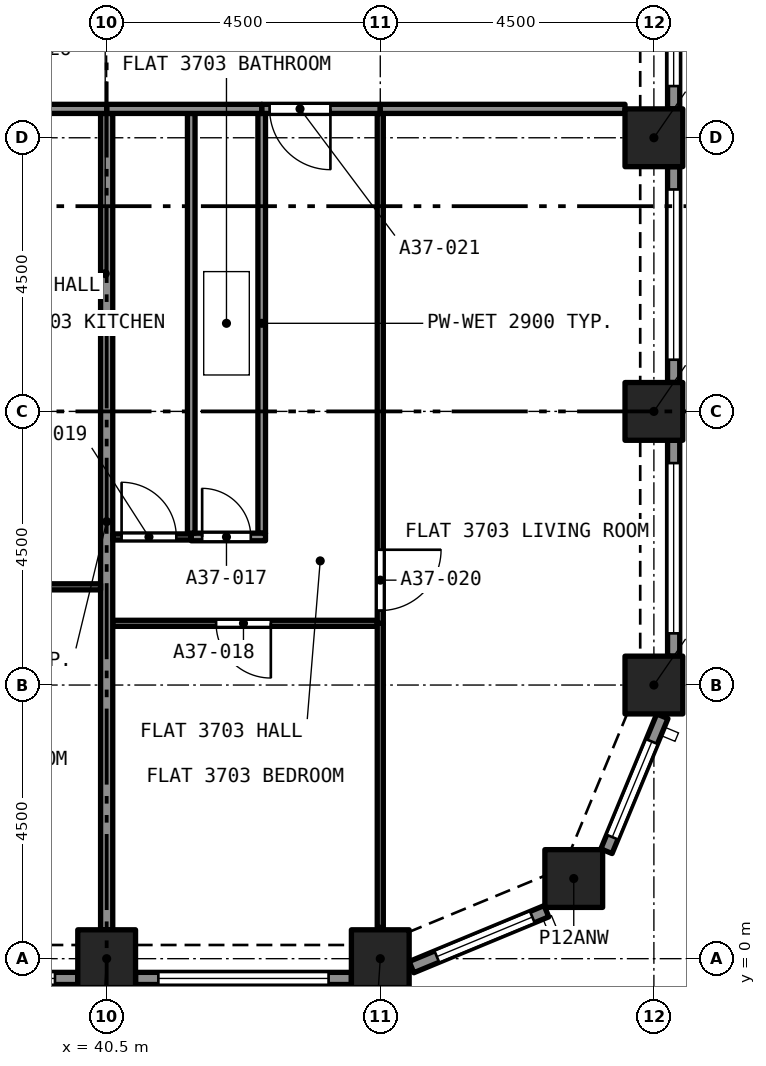
"""IFC4 building model, lengths in metres.
Left out: names, types, materials, properties, quantities, classifications, styles, units other than length and angle.
Written with IfcOpenShell. Run it as: python <this file> out.ifc"""

import sys

from ifc_helpers import new_model, si_unit, direction, frame, frame_2d, origin, origin_2d, place, context, subcontext, project, spatial, rectangle, extrude, element, fill, save


model = new_model("IFC4")
c1 = context("Model", 3, precision=1e-05, world=origin(), true_north=direction((0.0, 1.0)))
c2 = subcontext(c1, "Body", "Model", "MODEL_VIEW")
j1 = project(units=[si_unit("LENGTHUNIT", "METRE"), si_unit("PLANEANGLEUNIT", "RADIAN")], contexts=[c1])
p1 = place(None, origin())
s1 = spatial("IfcSite", under=j1, at=p1, CompositionType="ELEMENT")
p2 = place(p1, origin())
s2 = spatial("IfcBuilding", under=s1, at=p2, CompositionType="ELEMENT")
p3 = place(p2, frame((0.0, 0.0, 133.4)))
s3 = spatial("IfcBuildingStorey", under=s2, at=p3, CompositionType="ELEMENT", Elevation=133.4)
for number, where, z_axis, x_axis in (
    (1, (40.5, 0.0, 0.0), (0.0, 0.0, 1.0), (1.0, 0.0, 0.0)),
    (2, (45.0, 0.0, 0.0), (0.0, 0.0, 1.0), (1.0, 0.0, 0.0)),
    (3, (48.182, 1.318, 0.0), (0.0, 0.0, 1.0), (1.0, 0.0, 0.0)),
    (4, (49.5, 4.5, 0.0), (0.0, 0.0, 1.0), (1.0, 0.0, 0.0)),
    (5, (49.5, 9.0, 0.0), (0.0, 0.0, 1.0), (1.0, 0.0, 0.0)),
    (6, (49.5, 13.5, 0.0), (0.0, 0.0, 1.0), (1.0, 0.0, 0.0)),
):
    element("IfcColumn", number, at=place(p3, frame(where, z_axis=z_axis, x_axis=x_axis)), inside=s3, PredefinedType="COLUMN", context=c2, shape_type="SweptSolid", body=[
        extrude(rectangle(XDim=0.95, YDim=0.95, at=origin_2d()), origin(), (0.0, 0.0, 1.0), 3.2),
    ])
p4 = place(p3, frame((40.025, -0.325, 0.0), z_axis=(0.0, 0.0, 1.0), x_axis=(-1.0, 0.0, 0.0)))
e7 = element("IfcWall", 7, at=p4, inside=s3, PredefinedType="SOLIDWALL", context=c2, shape_type="SweptSolid", body=[
    extrude(rectangle(XDim=3.55, YDim=0.2, at=frame_2d((1.775, 0.0))), origin(), (0.0, 0.0, 1.0), 3.2),
])
p5 = place(p4, frame((0.375, 0.0, 0.45)))
e8 = element("IfcOpeningElement", 8, at=p5, cuts=e7, PredefinedType="OPENING", context=c2, shape_type="SweptSolid", body=[
    extrude(rectangle(XDim=2.8, YDim=1.95, at=frame_2d((1.4, 0.975))), frame((0.0, 0.11, 0.0), z_axis=(0.0, -1.0, 0.0), x_axis=(1.0, 0.0, 0.0)), (0.0, 0.0, 1.0), 0.22),
])
p6 = place(p3, frame((44.525, -0.325, 0.0), z_axis=(0.0, 0.0, 1.0), x_axis=(-1.0, 0.0, 0.0)))
e9 = element("IfcWall", 9, at=p6, inside=s3, PredefinedType="SOLIDWALL", context=c2, shape_type="SweptSolid", body=[
    extrude(rectangle(XDim=3.55, YDim=0.2, at=frame_2d((1.775, 0.0))), origin(), (0.0, 0.0, 1.0), 3.2),
])
p7 = place(p6, frame((0.375, 0.0, 0.45)))
e10 = element("IfcOpeningElement", 10, at=p7, cuts=e9, PredefinedType="OPENING", context=c2, shape_type="SweptSolid", body=[
    extrude(rectangle(XDim=2.8, YDim=1.95, at=frame_2d((1.4, 0.975))), frame((0.0, 0.11, 0.0), z_axis=(0.0, -1.0, 0.0), x_axis=(1.0, 0.0, 0.0)), (0.0, 0.0, 1.0), 0.22),
])
p8 = place(p3, frame((47.733, 0.78, 0.0), z_axis=(0.0, 0.0, 1.0), x_axis=(-0.923880599843, -0.382680855588, 0.0)))
e11 = element("IfcWall", 11, at=p8, inside=s3, PredefinedType="SOLIDWALL", context=c2, shape_type="SweptSolid", body=[
    extrude(rectangle(XDim=2.403, YDim=0.2, at=frame_2d((1.201, 0.0))), origin(), (0.0, 0.0, 1.0), 3.2),
])
p9 = place(p8, frame((0.251, 0.0, 0.45)))
e12 = element("IfcOpeningElement", 12, at=p9, cuts=e11, PredefinedType="OPENING", context=c2, shape_type="SweptSolid", body=[
    extrude(rectangle(XDim=1.7, YDim=1.95, at=frame_2d((0.85, 0.975))), frame((0.0, 0.11, 0.0), z_axis=(0.0, -1.0, 0.0), x_axis=(1.0, 0.0, 0.0)), (0.0, 0.0, 1.0), 0.22),
])
p10 = place(p3, frame((49.639, 3.987, 0.0), z_axis=(0.0, 0.0, 1.0), x_axis=(-0.382680855588, -0.923880599843, 0.0)))
e13 = element("IfcWall", 13, at=p10, inside=s3, PredefinedType="SOLIDWALL", context=c2, shape_type="SweptSolid", body=[
    extrude(rectangle(XDim=2.403, YDim=0.2, at=frame_2d((1.201, 0.0))), origin(), (0.0, 0.0, 1.0), 3.2),
])
p11 = place(p10, frame((0.451, 0.0, 0.45)))
e14 = element("IfcOpeningElement", 14, at=p11, cuts=e13, PredefinedType="OPENING", context=c2, shape_type="SweptSolid", body=[
    extrude(rectangle(XDim=1.7, YDim=1.95, at=frame_2d((0.85, 0.975))), frame((0.0, 0.11, 0.0), z_axis=(0.0, -1.0, 0.0), x_axis=(1.0, 0.0, 0.0)), (0.0, 0.0, 1.0), 0.22),
])
p12 = place(p3, frame((49.825, 8.525, 0.0), z_axis=(0.0, 0.0, 1.0), x_axis=(0.0, -1.0, 0.0)))
e15 = element("IfcWall", 15, at=p12, inside=s3, PredefinedType="SOLIDWALL", context=c2, shape_type="SweptSolid", body=[
    extrude(rectangle(XDim=3.55, YDim=0.2, at=frame_2d((1.775, 0.0))), origin(), (0.0, 0.0, 1.0), 3.2),
])
p13 = place(p12, frame((0.375, 0.0, 0.45)))
e16 = element("IfcOpeningElement", 16, at=p13, cuts=e15, PredefinedType="OPENING", context=c2, shape_type="SweptSolid", body=[
    extrude(rectangle(XDim=2.8, YDim=1.95, at=frame_2d((1.4, 0.975))), frame((0.0, 0.11, 0.0), z_axis=(0.0, -1.0, 0.0), x_axis=(1.0, 0.0, 0.0)), (0.0, 0.0, 1.0), 0.22),
])
p14 = place(p3, frame((49.825, 13.025, 0.0), z_axis=(0.0, 0.0, 1.0), x_axis=(0.0, -1.0, 0.0)))
e17 = element("IfcWall", 17, at=p14, inside=s3, PredefinedType="SOLIDWALL", context=c2, shape_type="SweptSolid", body=[
    extrude(rectangle(XDim=3.55, YDim=0.2, at=frame_2d((1.775, 0.0))), origin(), (0.0, 0.0, 1.0), 3.2),
])
p15 = place(p14, frame((0.375, 0.0, 0.45)))
e18 = element("IfcOpeningElement", 18, at=p15, cuts=e17, PredefinedType="OPENING", context=c2, shape_type="SweptSolid", body=[
    extrude(rectangle(XDim=2.8, YDim=1.95, at=frame_2d((1.4, 0.975))), frame((0.0, 0.11, 0.0), z_axis=(0.0, -1.0, 0.0), x_axis=(1.0, 0.0, 0.0)), (0.0, 0.0, 1.0), 0.22),
])
p16 = place(p3, frame((49.825, 17.525, 0.0), z_axis=(0.0, 0.0, 1.0), x_axis=(0.0, -1.0, 0.0)))
e19 = element("IfcWall", 19, at=p16, inside=s3, PredefinedType="SOLIDWALL", context=c2, shape_type="SweptSolid", body=[
    extrude(rectangle(XDim=3.55, YDim=0.2, at=frame_2d((1.775, 0.0))), origin(), (0.0, 0.0, 1.0), 3.2),
])
p17 = place(p16, frame((0.375, 0.0, 0.45)))
e20 = element("IfcOpeningElement", 20, at=p17, cuts=e19, PredefinedType="OPENING", context=c2, shape_type="SweptSolid", body=[
    extrude(rectangle(XDim=2.8, YDim=1.95, at=frame_2d((1.4, 0.975))), frame((0.0, 0.11, 0.0), z_axis=(0.0, -1.0, 0.0), x_axis=(1.0, 0.0, 0.0)), (0.0, 0.0, 1.0), 0.22),
])
p18 = place(p3, frame((43.05, 6.998, 0.0), z_axis=(0.0, 0.0, 1.0), x_axis=(0.0, 1.0, 0.0)))
e21 = element("IfcWall", 21, at=p18, inside=s3, PredefinedType="PARTITIONING", context=c2, shape_type="SweptSolid", body=[
    extrude(rectangle(XDim=6.902, YDim=0.125, at=frame_2d((3.451, 0.0))), origin(), (0.0, 0.0, 1.0), 2.9),
])
p19 = place(p3, frame((41.891, 6.935, 0.0), z_axis=(0.0, 0.0, 1.0), x_axis=(1.0, 0.0, 0.0)))
e22 = element("IfcWall", 22, at=p19, inside=s3, PredefinedType="PARTITIONING", context=c2, shape_type="SweptSolid", body=[
    extrude(rectangle(XDim=1.222, YDim=0.125, at=frame_2d((0.611, 0.0))), origin(), (0.0, 0.0, 1.0), 2.9),
])
p20 = place(p19, frame((0.179, 0.0, 0.0)))
e23 = element("IfcOpeningElement", 23, at=p20, cuts=e22, PredefinedType="OPENING", context=c2, shape_type="SweptSolid", body=[
    extrude(rectangle(XDim=0.8, YDim=2.1, at=frame_2d((0.4, 1.05))), frame((0.0, 0.073, 0.0), z_axis=(0.0, -1.0, 0.0), x_axis=(1.0, 0.0, 0.0)), (0.0, 0.0, 1.0), 0.145),
])
p21 = place(p3, frame((41.891, 6.998, 0.0), z_axis=(0.0, 0.0, 1.0), x_axis=(0.0, 1.0, 0.0)))
e24 = element("IfcWall", 24, at=p21, inside=s3, PredefinedType="PARTITIONING", context=c2, shape_type="SweptSolid", body=[
    extrude(rectangle(XDim=6.902, YDim=0.125, at=frame_2d((3.451, 0.0))), origin(), (0.0, 0.0, 1.0), 2.9),
])
p22 = place(p3, frame((44.95, 5.515, 0.0), z_axis=(0.0, 0.0, 1.0), x_axis=(-1.0, 0.0, 0.0)))
e25 = element("IfcWall", 25, at=p22, inside=s3, PredefinedType="PARTITIONING", context=c2, shape_type="SweptSolid", body=[
    extrude(rectangle(XDim=4.35, YDim=0.1, at=frame_2d((2.175, 0.0))), origin(), (0.0, 0.0, 1.0), 2.9),
])
p23 = place(p22, frame((1.75, 0.0, 0.0)))
e26 = element("IfcOpeningElement", 26, at=p23, cuts=e25, PredefinedType="OPENING", context=c2, shape_type="SweptSolid", body=[
    extrude(rectangle(XDim=0.9, YDim=2.1, at=frame_2d((0.45, 1.05))), frame((0.0, 0.06, 0.0), z_axis=(0.0, -1.0, 0.0), x_axis=(1.0, 0.0, 0.0)), (0.0, 0.0, 1.0), 0.12),
])
p24 = place(p3, frame((45.0, 0.514, 0.0), z_axis=(0.0, 0.0, 1.0), x_axis=(0.0, 1.0, 0.0)))
e27 = element("IfcWall", 27, at=p24, inside=s3, PredefinedType="PARTITIONING", context=c2, shape_type="SweptSolid", body=[
    extrude(rectangle(XDim=5.001, YDim=0.1, at=frame_2d((2.5, 0.0))), origin(), (0.0, 0.0, 1.0), 2.9),
])
p25 = place(p3, frame((40.5, 0.475, 0.0), z_axis=(0.0, 0.0, 1.0), x_axis=(0.0, 1.0, 0.0)))
e28 = element("IfcWall", 28, at=p25, inside=s3, PredefinedType="PARTITIONING", context=c2, shape_type="SweptSolid", body=[
    extrude(rectangle(XDim=13.425, YDim=0.2, at=frame_2d((6.712, 0.0))), origin(), (0.0, 0.0, 1.0), 2.9),
])
p26 = place(p3, frame((40.6, 6.935, 0.0), z_axis=(0.0, 0.0, 1.0), x_axis=(1.0, 0.0, 0.0)))
e29 = element("IfcWall", 29, at=p26, inside=s3, PredefinedType="PARTITIONING", context=c2, shape_type="SweptSolid", body=[
    extrude(rectangle(XDim=1.291, YDim=0.1, at=frame_2d((0.646, 0.0))), origin(), (0.0, 0.0, 1.0), 2.9),
])
p27 = place(p26, frame((0.146, 0.0, 0.0)))
e30 = element("IfcOpeningElement", 30, at=p27, cuts=e29, PredefinedType="OPENING", context=c2, shape_type="SweptSolid", body=[
    extrude(rectangle(XDim=0.9, YDim=2.1, at=frame_2d((0.45, 1.05))), frame((0.0, 0.06, 0.0), z_axis=(0.0, -1.0, 0.0), x_axis=(1.0, 0.0, 0.0)), (0.0, 0.0, 1.0), 0.12),
])
p28 = place(p3, frame((45.0, 13.9, 0.0), z_axis=(0.0, 0.0, 1.0), x_axis=(0.0, -1.0, 0.0)))
e31 = element("IfcWall", 31, at=p28, inside=s3, PredefinedType="PARTITIONING", context=c2, shape_type="SweptSolid", body=[
    extrude(rectangle(XDim=8.385, YDim=0.1, at=frame_2d((4.192, 0.0))), origin(), (0.0, 0.0, 1.0), 2.9),
])
p29 = place(p28, frame((7.175, 0.0, 0.0)))
e32 = element("IfcOpeningElement", 32, at=p29, cuts=e31, PredefinedType="OPENING", context=c2, shape_type="SweptSolid", body=[
    extrude(rectangle(XDim=1.0, YDim=2.1, at=frame_2d((0.5, 1.05))), frame((0.0, 0.06, 0.0), z_axis=(0.0, -1.0, 0.0), x_axis=(1.0, 0.0, 0.0)), (0.0, 0.0, 1.0), 0.12),
])
p30 = place(p3, frame((45.0, 13.975, 0.0), z_axis=(0.0, 0.0, 1.0), x_axis=(-1.0, 0.0, 0.0)))
e33 = element("IfcWall", 33, at=p30, inside=s3, PredefinedType="PARTITIONING", context=c2, shape_type="SweptSolid", body=[
    extrude(rectangle(XDim=1.95, YDim=0.15, at=frame_2d((0.975, 0.0))), origin(), (0.0, 0.0, 1.0), 2.9),
])
p31 = place(p30, frame((0.82, 0.0, 0.0)))
e34 = element("IfcOpeningElement", 34, at=p31, cuts=e33, PredefinedType="OPENING", context=c2, shape_type="SweptSolid", body=[
    extrude(rectangle(XDim=1.0, YDim=2.1, at=frame_2d((0.5, 1.05))), frame((0.0, 0.085, 0.0), z_axis=(0.0, -1.0, 0.0), x_axis=(1.0, 0.0, 0.0)), (0.0, 0.0, 1.0), 0.17),
])
p32 = place(p3, frame((40.5, 13.975, 0.0), z_axis=(0.0, 0.0, 1.0), x_axis=(1.0, 0.0, 0.0)))
e35 = element("IfcWall", 35, at=p32, inside=s3, PredefinedType="PARTITIONING", context=c2, shape_type="SweptSolid", body=[
    extrude(rectangle(XDim=2.55, YDim=0.15, at=frame_2d((1.275, 0.0))), origin(), (0.0, 0.0, 1.0), 2.9),
])
p33 = place(p3, frame((45.0, 13.975, 0.0), z_axis=(0.0, 0.0, 1.0), x_axis=(1.0, 0.0, 0.0)))
e36 = element("IfcWall", 36, at=p33, inside=s3, PredefinedType="PARTITIONING", context=c2, shape_type="SweptSolid", body=[
    extrude(rectangle(XDim=4.025, YDim=0.15, at=frame_2d((2.012, 0.0))), origin(), (0.0, 0.0, 1.0), 2.9),
])
p34 = place(p3, frame((40.4, 6.115, 0.0), z_axis=(0.0, 0.0, 1.0), x_axis=(-1.0, 0.0, 0.0)))
e37 = element("IfcWall", 37, at=p34, inside=s3, PredefinedType="PARTITIONING", context=c2, shape_type="SweptSolid", body=[
    extrude(rectangle(XDim=4.4, YDim=0.1, at=frame_2d((2.2, 0.0))), origin(), (0.0, 0.0, 1.0), 2.9),
])
p35 = place(p34, frame((1.7, 0.0, 0.0)))
e38 = element("IfcOpeningElement", 38, at=p35, cuts=e37, PredefinedType="OPENING", context=c2, shape_type="SweptSolid", body=[
    extrude(rectangle(XDim=0.9, YDim=2.1, at=frame_2d((0.45, 1.05))), frame((0.0, 0.06, 0.0), z_axis=(0.0, -1.0, 0.0), x_axis=(1.0, 0.0, 0.0)), (0.0, 0.0, 1.0), 0.12),
])
p36 = place(p3, frame((40.5, 13.975, 0.0), z_axis=(0.0, 0.0, 1.0), x_axis=(-1.0, 0.0, 0.0)))
e39 = element("IfcWall", 39, at=p36, inside=s3, PredefinedType="PARTITIONING", context=c2, shape_type="SweptSolid", body=[
    extrude(rectangle(XDim=2.85, YDim=0.15, at=frame_2d((1.425, 0.0))), origin(), (0.0, 0.0, 1.0), 2.9),
])
p37 = place(p36, frame((1.72, 0.0, 0.0)))
e40 = element("IfcOpeningElement", 40, at=p37, cuts=e39, PredefinedType="OPENING", context=c2, shape_type="SweptSolid", body=[
    extrude(rectangle(XDim=1.0, YDim=2.1, at=frame_2d((0.5, 1.05))), frame((0.0, 0.085, 0.0), z_axis=(0.0, -1.0, 0.0), x_axis=(1.0, 0.0, 0.0)), (0.0, 0.0, 1.0), 0.17),
])
p38 = place(p5, origin())
e41 = element("IfcWindow", 41, at=p38, inside=s3, PartitioningType="SINGLE_PANEL", PredefinedType="WINDOW", context=c2, shape_type="SweptSolid", body=[
    extrude(rectangle(XDim=2.8, YDim=1.95, at=frame_2d((1.4, 0.975))), frame((0.0, 0.03, 0.0), z_axis=(0.0, -1.0, 0.0), x_axis=(1.0, 0.0, 0.0)), (0.0, 0.0, 1.0), 0.06),
])
fill(e8, e41)
p39 = place(p7, origin())
e42 = element("IfcWindow", 42, at=p39, inside=s3, PartitioningType="SINGLE_PANEL", PredefinedType="WINDOW", context=c2, shape_type="SweptSolid", body=[
    extrude(rectangle(XDim=2.8, YDim=1.95, at=frame_2d((1.4, 0.975))), frame((0.0, 0.03, 0.0), z_axis=(0.0, -1.0, 0.0), x_axis=(1.0, 0.0, 0.0)), (0.0, 0.0, 1.0), 0.06),
])
fill(e10, e42)
p40 = place(p9, origin())
e43 = element("IfcWindow", 43, at=p40, inside=s3, PartitioningType="SINGLE_PANEL", PredefinedType="WINDOW", context=c2, shape_type="SweptSolid", body=[
    extrude(rectangle(XDim=1.7, YDim=1.95, at=frame_2d((0.85, 0.975))), frame((0.0, 0.03, 0.0), z_axis=(0.0, -1.0, 0.0), x_axis=(1.0, 0.0, 0.0)), (0.0, 0.0, 1.0), 0.06),
])
fill(e12, e43)
p41 = place(p11, origin())
e44 = element("IfcWindow", 44, at=p41, inside=s3, PartitioningType="SINGLE_PANEL", PredefinedType="WINDOW", context=c2, shape_type="SweptSolid", body=[
    extrude(rectangle(XDim=1.7, YDim=1.95, at=frame_2d((0.85, 0.975))), frame((0.0, 0.03, 0.0), z_axis=(0.0, -1.0, 0.0), x_axis=(1.0, 0.0, 0.0)), (0.0, 0.0, 1.0), 0.06),
])
fill(e14, e44)
p42 = place(p13, origin())
e45 = element("IfcWindow", 45, at=p42, inside=s3, PartitioningType="SINGLE_PANEL", PredefinedType="WINDOW", context=c2, shape_type="SweptSolid", body=[
    extrude(rectangle(XDim=2.8, YDim=1.95, at=frame_2d((1.4, 0.975))), frame((0.0, 0.03, 0.0), z_axis=(0.0, -1.0, 0.0), x_axis=(1.0, 0.0, 0.0)), (0.0, 0.0, 1.0), 0.06),
])
fill(e16, e45)
p43 = place(p15, origin())
e46 = element("IfcWindow", 46, at=p43, inside=s3, PartitioningType="SINGLE_PANEL", PredefinedType="WINDOW", context=c2, shape_type="SweptSolid", body=[
    extrude(rectangle(XDim=2.8, YDim=1.95, at=frame_2d((1.4, 0.975))), frame((0.0, 0.03, 0.0), z_axis=(0.0, -1.0, 0.0), x_axis=(1.0, 0.0, 0.0)), (0.0, 0.0, 1.0), 0.06),
])
fill(e18, e46)
p44 = place(p17, origin())
e47 = element("IfcWindow", 47, at=p44, inside=s3, PartitioningType="SINGLE_PANEL", PredefinedType="WINDOW", context=c2, shape_type="SweptSolid", body=[
    extrude(rectangle(XDim=2.8, YDim=1.95, at=frame_2d((1.4, 0.975))), frame((0.0, 0.03, 0.0), z_axis=(0.0, -1.0, 0.0), x_axis=(1.0, 0.0, 0.0)), (0.0, 0.0, 1.0), 0.06),
])
fill(e20, e47)
p45 = place(p20, origin())
e48 = element("IfcDoor", 48, at=p45, inside=s3, OperationType="SINGLE_SWING_LEFT", PredefinedType="DOOR", context=c2, shape_type="SweptSolid", body=[
    extrude(rectangle(XDim=0.8, YDim=2.1, at=frame_2d((0.4, 1.05))), frame((0.0, 0.025, 0.0), z_axis=(0.0, -1.0, 0.0), x_axis=(1.0, 0.0, 0.0)), (0.0, 0.0, 1.0), 0.05),
])
fill(e23, e48)
p46 = place(p23, origin())
e49 = element("IfcDoor", 49, at=p46, inside=s3, OperationType="SINGLE_SWING_RIGHT", PredefinedType="DOOR", context=c2, shape_type="SweptSolid", body=[
    extrude(rectangle(XDim=0.9, YDim=2.1, at=frame_2d((0.45, 1.05))), frame((0.0, 0.025, 0.0), z_axis=(0.0, -1.0, 0.0), x_axis=(1.0, 0.0, 0.0)), (0.0, 0.0, 1.0), 0.05),
])
fill(e26, e49)
p47 = place(p27, origin())
e50 = element("IfcDoor", 50, at=p47, inside=s3, OperationType="SINGLE_SWING_LEFT", PredefinedType="DOOR", context=c2, shape_type="SweptSolid", body=[
    extrude(rectangle(XDim=0.9, YDim=2.1, at=frame_2d((0.45, 1.05))), frame((0.0, 0.025, 0.0), z_axis=(0.0, -1.0, 0.0), x_axis=(1.0, 0.0, 0.0)), (0.0, 0.0, 1.0), 0.05),
])
fill(e30, e50)
p48 = place(p29, origin())
e51 = element("IfcDoor", 51, at=p48, inside=s3, OperationType="SINGLE_SWING_RIGHT", PredefinedType="DOOR", context=c2, shape_type="SweptSolid", body=[
    extrude(rectangle(XDim=1.0, YDim=2.1, at=frame_2d((0.5, 1.05))), frame((0.0, 0.025, 0.0), z_axis=(0.0, -1.0, 0.0), x_axis=(1.0, 0.0, 0.0)), (0.0, 0.0, 1.0), 0.05),
])
fill(e32, e51)
p49 = place(p31, origin())
e52 = element("IfcDoor", 52, at=p49, inside=s3, OperationType="SINGLE_SWING_RIGHT", PredefinedType="DOOR", context=c2, shape_type="SweptSolid", body=[
    extrude(rectangle(XDim=1.0, YDim=2.1, at=frame_2d((0.5, 1.05))), frame((0.0, 0.025, 0.0), z_axis=(0.0, -1.0, 0.0), x_axis=(1.0, 0.0, 0.0)), (0.0, 0.0, 1.0), 0.05),
])
fill(e34, e52)
save(model, sys.argv[1])
